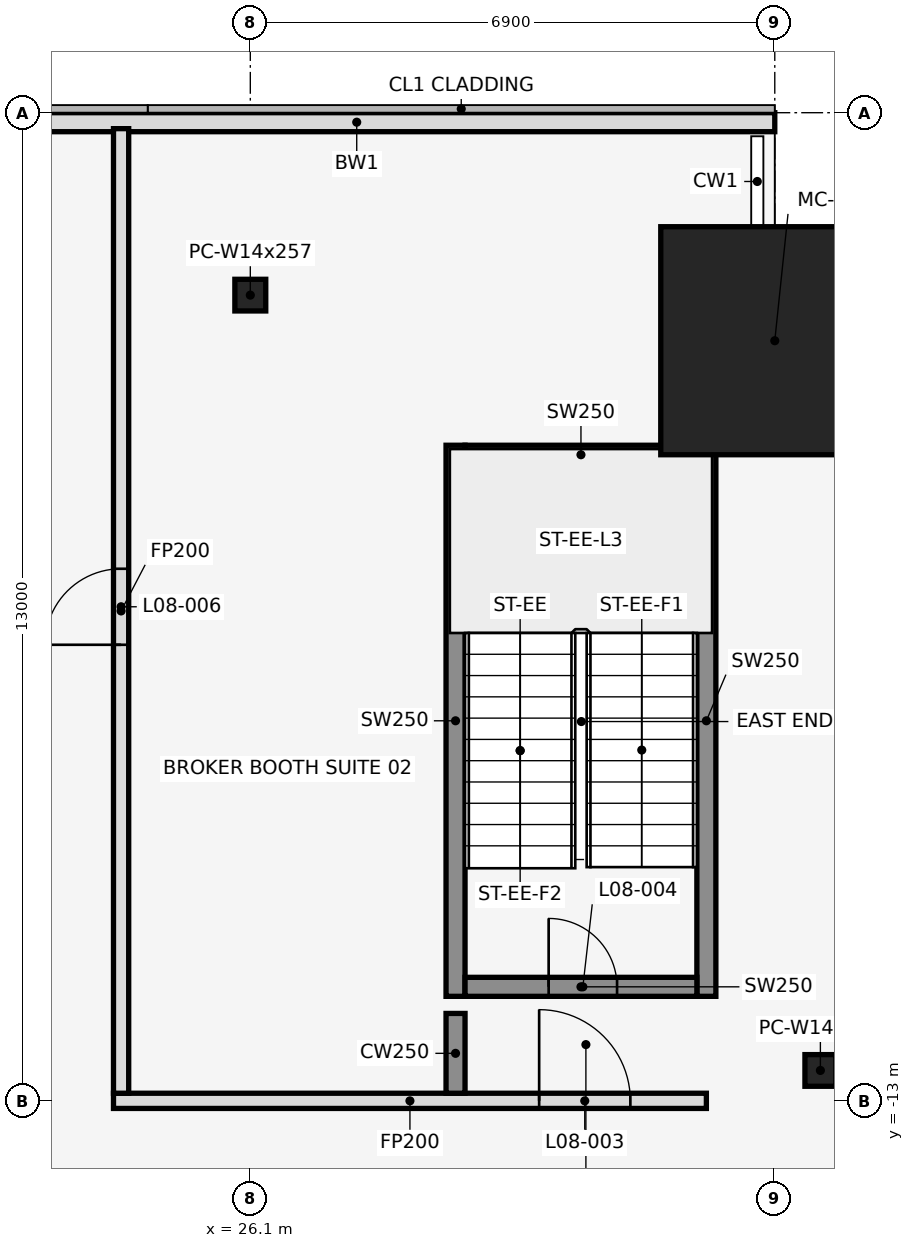
"""IFC4 building model, lengths in metres.
Left out: names, types, materials, properties, quantities, classifications, styles, units other than length and angle.
Written with IfcOpenShell. Run it as: python <this file> out.ifc"""

import sys

from ifc_helpers import new_model, si_unit, direction, frame, frame_2d, origin, origin_2d, place, context, subcontext, project, spatial, rectangle, hollow_rectangle, i_section, extrude, element, fill, save


model = new_model("IFC4")
c1 = context("Model", 3, precision=1e-05, world=origin(), true_north=direction((0.0, 1.0)))
c2 = subcontext(c1, "Body", "Model", "MODEL_VIEW")
j1 = project(units=[si_unit("LENGTHUNIT", "METRE"), si_unit("PLANEANGLEUNIT", "RADIAN")], contexts=[c1])
p1 = place(None, origin())
s1 = spatial("IfcSite", under=j1, at=p1, CompositionType="ELEMENT")
p2 = place(p1, origin())
s2 = spatial("IfcBuilding", under=s1, at=p2, CompositionType="ELEMENT")
p3 = place(p2, frame((0.0, 0.0, 44.0)))
s3 = spatial("IfcBuildingStorey", under=s2, at=p3, CompositionType="ELEMENT", Elevation=44.0)
p4 = place(p3, frame((26.1, -2.4, 0.0), z_axis=(0.0, 0.0, 1.0), x_axis=(1.0, 0.0, 0.0)))
e1 = element("IfcColumn", 1, at=p4, inside=s3, PredefinedType="COLUMN", context=c2, shape_type="SweptSolid", body=[
    extrude(i_section(OverallWidth=0.406, OverallDepth=0.417, WebThickness=0.03, FlangeThickness=0.048, at=origin_2d()), origin(), (0.0, 0.0, 1.0), 4.5),
])
p5 = place(p3, frame((33.0, -3.0, 0.0), z_axis=(0.0, 0.0, 1.0), x_axis=(1.0, 0.0, 0.0)))
e2 = element("IfcColumn", 2, at=p5, inside=s3, PredefinedType="COLUMN", context=c2, shape_type="SweptSolid", body=[
    extrude(hollow_rectangle(XDim=3.0, YDim=3.0, WallThickness=0.1, at=origin_2d()), origin(), (0.0, 0.0, 1.0), 4.5),
])
p6 = place(p3, frame((33.6, -12.6, 0.0), z_axis=(0.0, 0.0, 1.0), x_axis=(1.0, 0.0, 0.0)))
e3 = element("IfcColumn", 3, at=p6, inside=s3, PredefinedType="COLUMN", context=c2, shape_type="SweptSolid", body=[
    extrude(i_section(OverallWidth=0.406, OverallDepth=0.417, WebThickness=0.03, FlangeThickness=0.048, at=origin_2d()), origin(), (0.0, 0.0, 1.0), 4.5),
])
p7 = place(p3, frame((33.0, -0.125, 0.0), z_axis=(0.0, 0.0, 1.0), x_axis=(-1.0, 0.0, 0.0)))
e4 = element("IfcWall", 4, at=p7, inside=s3, PredefinedType="STANDARD", context=c2, shape_type="SweptSolid", body=[
    extrude(rectangle(XDim=11.0, YDim=0.25, at=frame_2d((5.5, 0.0))), origin(), (0.0, 0.0, 1.0), 4.35),
])
for number, where, z_axis, x_axis in (
    (5, (28.8, -11.625, 0.0), (0.0, 0.0, 1.0), (0.0, 1.0, 0.0)),
    (6, (32.1, -11.625, 0.0), (0.0, 0.0, 1.0), (0.0, 1.0, 0.0)),
):
    element("IfcWall", number, at=place(p3, frame(where, z_axis=z_axis, x_axis=x_axis)), inside=s3, PredefinedType="SHEAR", context=c2, shape_type="SweptSolid", body=[
        extrude(rectangle(XDim=7.25, YDim=0.25, at=frame_2d((3.625, 0.0))), origin(), (0.0, 0.0, 1.0), 4.5),
    ])
p8 = place(p3, frame((28.925, -11.5, 0.0), z_axis=(0.0, 0.0, 1.0), x_axis=(1.0, 0.0, 0.0)))
e7 = element("IfcWall", 7, at=p8, inside=s3, PredefinedType="SHEAR", context=c2, shape_type="SweptSolid", body=[
    extrude(rectangle(XDim=3.05, YDim=0.25, at=frame_2d((1.525, 0.0))), origin(), (0.0, 0.0, 1.0), 4.5),
])
p9 = place(p8, frame((1.1, 0.0, 0.0)))
e8 = element("IfcOpeningElement", 8, at=p9, cuts=e7, PredefinedType="OPENING", context=c2, shape_type="SweptSolid", body=[
    extrude(rectangle(XDim=0.9, YDim=2.1, at=frame_2d((0.45, 1.05))), frame((0.0, 0.137, 0.0), z_axis=(0.0, -1.0, 0.0), x_axis=(1.0, 0.0, 0.0)), (0.0, 0.0, 1.0), 0.274),
])
p10 = place(p3, frame((28.925, -4.5, 0.0), z_axis=(0.0, 0.0, 1.0), x_axis=(1.0, 0.0, 0.0)))
e9 = element("IfcWall", 9, at=p10, inside=s3, PredefinedType="SHEAR", context=c2, shape_type="SweptSolid", body=[
    extrude(rectangle(XDim=3.05, YDim=0.25, at=frame_2d((1.525, 0.0))), origin(), (0.0, 0.0, 1.0), 4.5),
])
p11 = place(p3, frame((24.3, -13.0, 0.0), z_axis=(0.0, 0.0, 1.0), x_axis=(1.0, 0.0, 0.0)))
e10 = element("IfcWall", 10, at=p11, inside=s3, PredefinedType="PARTITIONING", context=c2, shape_type="SweptSolid", body=[
    extrude(rectangle(XDim=7.8, YDim=0.2, at=frame_2d((3.9, 0.0))), origin(), (0.0, 0.0, 1.0), 3.418),
])
p12 = place(p11, frame((5.6, 0.0, 0.0)))
e11 = element("IfcOpeningElement", 11, at=p12, cuts=e10, PredefinedType="OPENING", context=c2, shape_type="SweptSolid", body=[
    extrude(rectangle(XDim=1.2, YDim=2.1, at=frame_2d((0.6, 1.05))), frame((0.0, 0.112, 0.0), z_axis=(0.0, -1.0, 0.0), x_axis=(1.0, 0.0, 0.0)), (0.0, 0.0, 1.0), 0.224),
])
p13 = place(p3, frame((24.4, -12.9, 0.0), z_axis=(0.0, 0.0, 1.0), x_axis=(0.0, 1.0, 0.0)))
e12 = element("IfcWall", 12, at=p13, inside=s3, PredefinedType="PARTITIONING", context=c2, shape_type="SweptSolid", body=[
    extrude(rectangle(XDim=12.69, YDim=0.2, at=frame_2d((6.345, 0.0))), origin(), (0.0, 0.0, 1.0), 3.418),
])
p14 = place(p13, frame((5.9, 0.0, 0.0)))
e13 = element("IfcOpeningElement", 13, at=p14, cuts=e12, PredefinedType="OPENING", context=c2, shape_type="SweptSolid", body=[
    extrude(rectangle(XDim=1.0, YDim=2.1, at=frame_2d((0.5, 1.05))), frame((0.0, 0.112, 0.0), z_axis=(0.0, -1.0, 0.0), x_axis=(1.0, 0.0, 0.0)), (0.0, 0.0, 1.0), 0.224),
])
p15 = place(p3, frame((28.8, -12.9, 0.0), z_axis=(0.0, 0.0, 1.0), x_axis=(0.0, 1.0, 0.0)))
e14 = element("IfcWall", 14, at=p15, inside=s3, PredefinedType="SHEAR", context=c2, shape_type="SweptSolid", body=[
    extrude(rectangle(XDim=1.05, YDim=0.25, at=frame_2d((0.525, 0.0))), origin(), (0.0, 0.0, 1.0), 4.5),
])
p16 = place(p12, origin())
e15 = element("IfcDoor", 15, at=p16, inside=s3, OperationType="SINGLE_SWING_RIGHT", PredefinedType="DOOR", context=c2, shape_type="SweptSolid", body=[
    extrude(rectangle(XDim=1.2, YDim=2.1, at=frame_2d((0.6, 1.05))), frame((0.0, 0.025, 0.0), z_axis=(0.0, -1.0, 0.0), x_axis=(1.0, 0.0, 0.0)), (0.0, 0.0, 1.0), 0.05),
])
fill(e11, e15)
p17 = place(p9, origin())
e16 = element("IfcDoor", 16, at=p17, inside=s3, OperationType="SINGLE_SWING_LEFT", PredefinedType="DOOR", context=c2, shape_type="SweptSolid", body=[
    extrude(rectangle(XDim=0.9, YDim=2.1, at=frame_2d((0.45, 1.05))), frame((0.0, 0.025, 0.0), z_axis=(0.0, -1.0, 0.0), x_axis=(1.0, 0.0, 0.0)), (0.0, 0.0, 1.0), 0.05),
])
fill(e8, e16)
p18 = place(p14, frame((1.0, 0.0, 0.0), z_axis=(0.0, 0.0, 1.0), x_axis=(-1.0, 0.0, 0.0)))
e17 = element("IfcDoor", 17, at=p18, inside=s3, OperationType="SINGLE_SWING_RIGHT", PredefinedType="DOOR", context=c2, shape_type="SweptSolid", body=[
    extrude(rectangle(XDim=1.0, YDim=2.1, at=frame_2d((0.5, 1.05))), frame((0.0, 0.025, 0.0), z_axis=(0.0, -1.0, 0.0), x_axis=(1.0, 0.0, 0.0)), (0.0, 0.0, 1.0), 0.05),
])
fill(e13, e17)
save(model, sys.argv[1])
